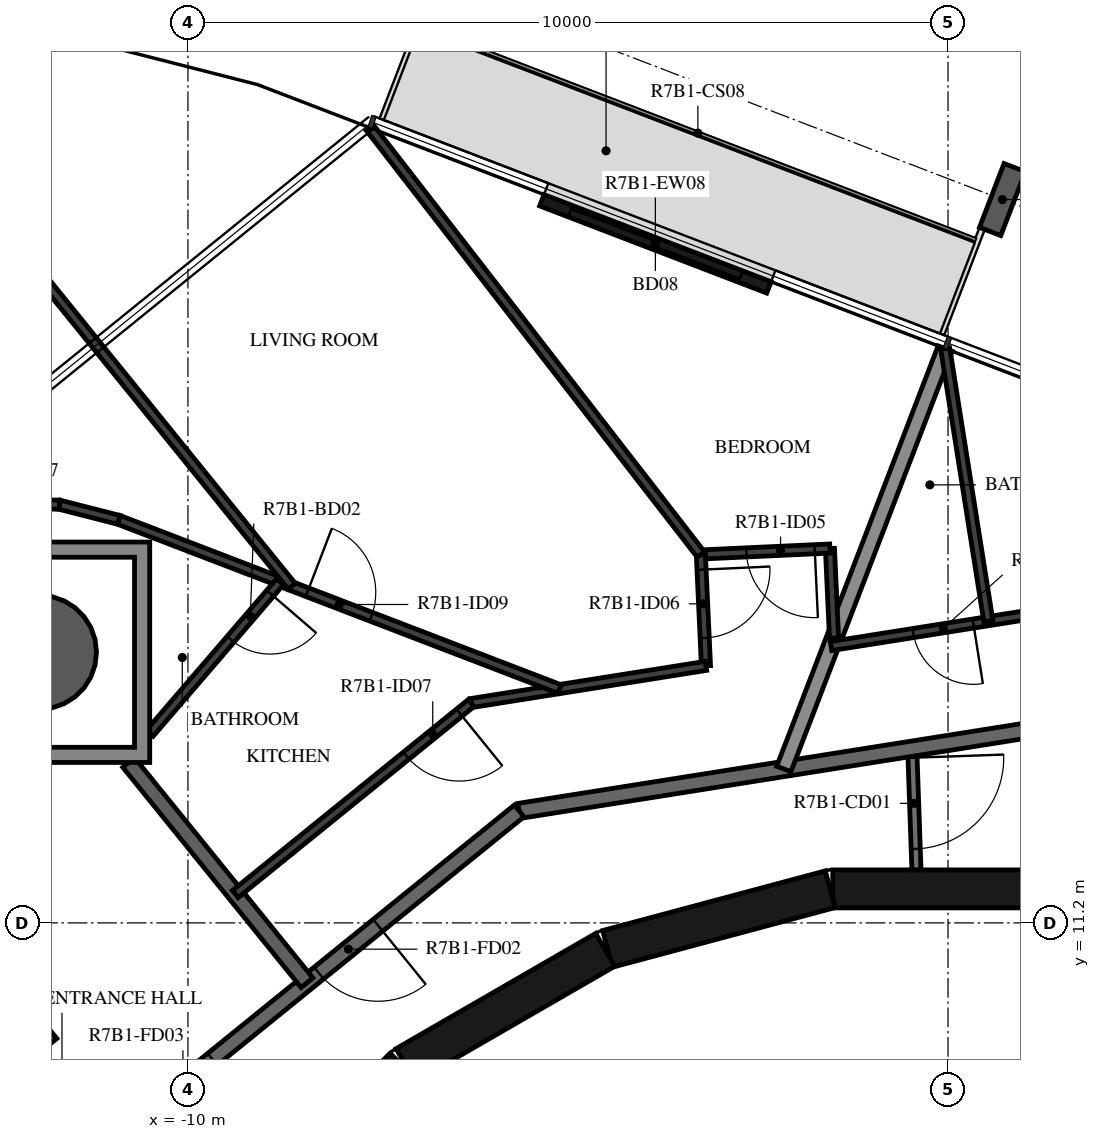
"""IFC4 building model, lengths in metres.
Left out: names, types, materials, properties, quantities, classifications, styles, units other than length and angle.
Written with IfcOpenShell. Run it as: python <this file> out.ifc"""

import sys

from ifc_helpers import new_model, si_unit, direction, frame, frame_2d, origin, origin_2d, place, context, subcontext, project, spatial, polyline, rectangle, hollow_circle, i_section, outline, extrude, element, fill, save


model = new_model("IFC4")
c1 = context("Model", 3, precision=1e-05, world=origin(), true_north=direction((0.0, 1.0)))
c2 = subcontext(c1, "Body", "Model", "MODEL_VIEW")
j1 = project(units=[si_unit("LENGTHUNIT", "METRE"), si_unit("PLANEANGLEUNIT", "RADIAN")], contexts=[c1])
p1 = place(None, origin())
s1 = spatial("IfcSite", under=j1, at=p1, CompositionType="ELEMENT")
p2 = place(p1, origin())
s2 = spatial("IfcBuilding", under=s1, at=p2, CompositionType="ELEMENT")
p3 = place(p2, frame((0.0, 0.0, 273.9)))
s3 = spatial("IfcBuildingStorey", under=s2, at=p3, CompositionType="ELEMENT", Elevation=273.9)
p4 = place(p3, frame((-11.953, 14.76, -0.38), z_axis=(0.0, 0.0, 1.0), x_axis=(1.0, 0.0, 0.0)))
e1 = element("IfcColumn", 1, at=p4, inside=s3, PredefinedType="COLUMN", context=c2, shape_type="SweptSolid", body=[
    extrude(hollow_circle(Radius=0.75, WallThickness=0.035, at=origin_2d()), origin(), (0.0, 0.0, 1.0), 3.5),
])
p5 = place(p3, frame((0.715, 20.716, -0.38), z_axis=(0.0, 0.0, 1.0), x_axis=(0.933580354843, -0.35836813621, 0.0)))
e2 = element("IfcColumn", 2, at=p5, inside=s3, PredefinedType="COLUMN", context=c2, shape_type="SweptSolid", body=[
    extrude(i_section(OverallWidth=0.3, OverallDepth=0.9, WebThickness=0.019, FlangeThickness=0.035, FilletRadius=0.03, at=origin_2d()), origin(), (0.0, 0.0, 1.0), 3.5),
])
p6 = place(p3, frame((-2.357, 19.56, 0.0), z_axis=(0.0, 0.0, 1.0), x_axis=(-0.933553885508, 0.358437083534, 0.0)))
e3 = element("IfcWall", 3, at=p6, inside=s3, PredefinedType="STANDARD", context=c2, shape_type="SweptSolid", body=[
    extrude(rectangle(XDim=3.2, YDim=0.16, at=frame_2d((1.6, 0.0))), origin(), (0.0, 0.0, 1.0), 3.12),
])
p7 = place(p6, frame((0.4, 0.0, 0.0)))
e4 = element("IfcOpeningElement", 4, at=p7, cuts=e3, PredefinedType="OPENING", context=c2, shape_type="SweptSolid", body=[
    extrude(rectangle(XDim=2.4, YDim=2.4, at=frame_2d((1.2, 1.2))), frame((0.0, 0.09, 0.0), z_axis=(0.0, -1.0, 0.0), x_axis=(1.0, 0.0, 0.0)), (0.0, 0.0, 1.0), 0.18),
])
for number, where, z_axis, x_axis in (
    (5, (1.516, 11.647, 0.0), (0.0, 0.0, 1.0), (-1.0, 0.0, 0.0)),
    (6, (-1.55, 11.643, 0.0), (0.0, 0.0, 1.0), (-0.966, -0.259, 0.0)),
    (7, (-4.51, 10.845, 0.0), (0.0, 0.0, 1.0), (-0.866, -0.5, 0.0)),
):
    element("IfcWall", number, at=place(p3, frame(where, z_axis=z_axis, x_axis=x_axis)), inside=s3, PredefinedType="SHEAR", context=c2, shape_type="SweptSolid", body=[
        extrude(rectangle(XDim=3.033, YDim=0.5, at=frame_2d((1.516, 0.0))), origin(), (0.0, 0.0, 1.0), 3.12),
    ])
p8 = place(p3, frame((-7.164, 9.308, 0.0), z_axis=(0.0, 0.0, 1.0), x_axis=(-0.707106781187, -0.707106781187, 0.0)))
e8 = element("IfcWall", 8, at=p8, inside=s3, PredefinedType="SHEAR", context=c2, shape_type="SweptSolid", body=[
    extrude(rectangle(XDim=3.032, YDim=0.5, at=frame_2d((1.516, 0.0))), origin(), (0.0, 0.0, 1.0), 3.12),
])
p9 = place(p8, frame((1.416, 0.0, 0.0)))
e9 = element("IfcOpeningElement", 9, at=p9, cuts=e8, PredefinedType="OPENING", context=c2, shape_type="SweptSolid", body=[
    extrude(rectangle(XDim=1.2, YDim=2.1, at=frame_2d((0.6, 1.05))), frame((0.0, 0.26, 0.0), z_axis=(0.0, -1.0, 0.0), x_axis=(1.0, 0.0, 0.0)), (0.0, 0.0, 1.0), 0.52),
])
p10 = place(p3, frame((-0.471, 13.492, 0.0), z_axis=(0.0, 0.0, 1.0), x_axis=(0.034873173869, -0.999391745886, 0.0)))
e10 = element("IfcWall", 10, at=p10, inside=s3, PredefinedType="PARTITIONING", context=c2, shape_type="SweptSolid", body=[
    extrude(rectangle(XDim=1.596, YDim=0.12, at=frame_2d((0.798, 0.0))), origin(), (0.0, 0.0, 1.0), 3.12),
])
p11 = place(p10, frame((0.12, 0.0, 0.0)))
e11 = element("IfcOpeningElement", 11, at=p11, cuts=e10, PredefinedType="OPENING", context=c2, shape_type="SweptSolid", body=[
    extrude(rectangle(XDim=1.2, YDim=2.1, at=frame_2d((0.6, 1.05))), frame((0.0, 0.07, 0.0), z_axis=(0.0, -1.0, 0.0), x_axis=(1.0, 0.0, 0.0)), (0.0, 0.0, 1.0), 0.14),
])
p12 = place(p3, frame((1.45, 13.797, 0.0), z_axis=(0.0, 0.0, 1.0), x_axis=(-0.987690361611, -0.156421704315, 0.0)))
e12 = element("IfcWall", 12, at=p12, inside=s3, PredefinedType="STANDARD", context=c2, shape_type="SweptSolid", body=[
    extrude(rectangle(XDim=7.181, YDim=0.2, at=frame_2d((3.591, 0.0))), origin(), (0.0, 0.0, 1.0), 3.12),
])
p13 = place(p3, frame((-5.643, 12.673, 0.0), z_axis=(0.0, 0.0, 1.0), x_axis=(-0.777160148113, -0.629302871585, 0.0)))
e13 = element("IfcWall", 13, at=p13, inside=s3, PredefinedType="STANDARD", context=c2, shape_type="SweptSolid", body=[
    extrude(rectangle(XDim=7.181, YDim=0.2, at=frame_2d((3.59, 0.0))), origin(), (0.0, 0.0, 1.0), 3.12),
])
p14 = place(p13, frame((2.39, 0.0, 0.0)))
e14 = element("IfcOpeningElement", 14, at=p14, cuts=e13, PredefinedType="OPENING", context=c2, shape_type="SweptSolid", body=[
    extrude(rectangle(XDim=1.0, YDim=2.1, at=frame_2d((0.5, 1.05))), frame((0.0, 0.11, 0.0), z_axis=(0.0, -1.0, 0.0), x_axis=(1.0, 0.0, 0.0)), (0.0, 0.0, 1.0), 0.22),
])
p15 = place(p13, frame((5.192, 0.0, 0.0)))
e15 = element("IfcOpeningElement", 15, at=p15, cuts=e13, PredefinedType="OPENING", context=c2, shape_type="SweptSolid", body=[
    extrude(rectangle(XDim=1.0, YDim=2.1, at=frame_2d((0.5, 1.05))), frame((0.0, 0.11, 0.0), z_axis=(0.0, -1.0, 0.0), x_axis=(1.0, 0.0, 0.0)), (0.0, 0.0, 1.0), 0.22),
])
p16 = place(p3, frame((-0.037, 18.756, 0.0), z_axis=(0.0, 0.0, 1.0), x_axis=(-0.358365943542, -0.933581196527, 0.0)))
e16 = element("IfcWall", 16, at=p16, inside=s3, PredefinedType="STANDARD", context=c2, shape_type="SweptSolid", body=[
    extrude(rectangle(XDim=5.924, YDim=0.2, at=frame_2d((2.962, 0.0))), origin(), (0.0, 0.0, 1.0), 2.73),
])
p17 = place(p3, frame((-10.779, 13.31, 0.0), z_axis=(0.0, 0.0, 1.0), x_axis=(0.62931692753, -0.777148766147, 0.0)))
e17 = element("IfcWall", 17, at=p17, inside=s3, PredefinedType="STANDARD", context=c2, shape_type="SweptSolid", body=[
    extrude(rectangle(XDim=3.727, YDim=0.2, at=frame_2d((1.864, 0.0))), origin(), (0.0, 0.0, 1.0), 3.12),
])
p18 = place(p3, frame((1.612, 15.341, 0.0), z_axis=(0.0, 0.0, 1.0), x_axis=(-0.987687176419, -0.156441815179, 0.0)))
e18 = element("IfcWall", 18, at=p18, inside=s3, PredefinedType="PARTITIONING", context=c2, shape_type="SweptSolid", body=[
    extrude(rectangle(XDim=3.191, YDim=0.12, at=frame_2d((1.596, 0.0))), origin(), (0.0, 0.0, 1.0), 3.12),
])
p19 = place(p18, frame((1.295, 0.0, 0.0)))
e19 = element("IfcOpeningElement", 19, at=p19, cuts=e18, PredefinedType="OPENING", context=c2, shape_type="SweptSolid", body=[
    extrude(rectangle(XDim=0.8, YDim=2.1, at=frame_2d((0.4, 1.05))), frame((0.0, 0.07, 0.0), z_axis=(0.0, -1.0, 0.0), x_axis=(1.0, 0.0, 0.0)), (0.0, 0.0, 1.0), 0.14),
])
p20 = place(p3, frame((-0.037, 18.756, 0.0), z_axis=(0.0, 0.0, 1.0), x_axis=(0.156421851095, -0.987690338365, 0.0)))
e20 = element("IfcWall", 20, at=p20, inside=s3, PredefinedType="PARTITIONING", context=c2, shape_type="SweptSolid", body=[
    extrude(rectangle(XDim=3.63, YDim=0.12, at=frame_2d((1.815, 0.0))), origin(), (0.0, 0.0, 1.0), 3.12),
])
p21 = place(p3, frame((-1.5, 14.946, 0.0), z_axis=(0.0, 0.0, 1.0), x_axis=(-0.045923747874, 0.998944948123, 0.0)))
e21 = element("IfcWall", 21, at=p21, inside=s3, PredefinedType="PARTITIONING", context=c2, shape_type="SweptSolid", body=[
    extrude(rectangle(XDim=1.18, YDim=0.12, at=frame_2d((0.59, 0.0))), origin(), (0.0, 0.0, 1.0), 3.12),
])
p22 = place(p3, frame((-1.554, 16.125, 0.0), z_axis=(0.0, 0.0, 1.0), x_axis=(-0.998943517875, -0.045954848436, 0.0)))
e22 = element("IfcWall", 22, at=p22, inside=s3, PredefinedType="PARTITIONING", context=c2, shape_type="SweptSolid", body=[
    extrude(rectangle(XDim=1.7, YDim=0.12, at=frame_2d((0.85, 0.0))), origin(), (0.0, 0.0, 1.0), 3.12),
])
p23 = place(p22, frame((0.2, 0.0, 0.0)))
e23 = element("IfcOpeningElement", 23, at=p23, cuts=e22, PredefinedType="OPENING", context=c2, shape_type="SweptSolid", body=[
    extrude(rectangle(XDim=0.9, YDim=2.1, at=frame_2d((0.45, 1.05))), frame((0.0, 0.07, 0.0), z_axis=(0.0, -1.0, 0.0), x_axis=(1.0, 0.0, 0.0)), (0.0, 0.0, 1.0), 0.14),
])
p24 = place(p3, frame((-3.252, 16.047, 0.0), z_axis=(0.0, 0.0, 1.0), x_axis=(0.045928493331, -0.998944729953, 0.0)))
e24 = element("IfcWall", 24, at=p24, inside=s3, PredefinedType="PARTITIONING", context=c2, shape_type="SweptSolid", body=[
    extrude(rectangle(XDim=1.467, YDim=0.12, at=frame_2d((0.733, 0.0))), origin(), (0.0, 0.0, 1.0), 3.12),
])
p25 = place(p24, frame((0.2, 0.0, 0.0)))
e25 = element("IfcOpeningElement", 25, at=p25, cuts=e24, PredefinedType="OPENING", context=c2, shape_type="SweptSolid", body=[
    extrude(rectangle(XDim=0.9, YDim=2.1, at=frame_2d((0.45, 1.05))), frame((0.0, 0.07, 0.0), z_axis=(0.0, -1.0, 0.0), x_axis=(1.0, 0.0, 0.0)), (0.0, 0.0, 1.0), 0.14),
])
p26 = place(p3, frame((-3.185, 14.581, 0.0), z_axis=(0.0, 0.0, 1.0), x_axis=(-0.987690712769, -0.156419486991, 0.0)))
e26 = element("IfcWall", 26, at=p26, inside=s3, PredefinedType="PARTITIONING", context=c2, shape_type="SweptSolid", body=[
    extrude(rectangle(XDim=3.128, YDim=0.12, at=frame_2d((1.564, 0.0))), origin(), (0.0, 0.0, 1.0), 3.12),
])
p27 = place(p3, frame((-6.274, 14.092, 0.0), z_axis=(0.0, 0.0, 1.0), x_axis=(-0.777162268892, -0.629300252511, 0.0)))
e27 = element("IfcWall", 27, at=p27, inside=s3, PredefinedType="PARTITIONING", context=c2, shape_type="SweptSolid", body=[
    extrude(rectangle(XDim=3.992, YDim=0.12, at=frame_2d((1.996, 0.0))), origin(), (0.0, 0.0, 1.0), 3.12),
])
p28 = place(p27, frame((0.2, 0.0, 0.0)))
e28 = element("IfcOpeningElement", 28, at=p28, cuts=e27, PredefinedType="OPENING", context=c2, shape_type="SweptSolid", body=[
    extrude(rectangle(XDim=0.9, YDim=2.1, at=frame_2d((0.45, 1.05))), frame((0.0, 0.07, 0.0), z_axis=(0.0, -1.0, 0.0), x_axis=(1.0, 0.0, 0.0)), (0.0, 0.0, 1.0), 0.14),
])
p29 = place(p3, frame((-7.606, 21.661, 0.0), z_axis=(0.0, 0.0, 1.0), x_axis=(0.612852858705, -0.79019704731, 0.0)))
e29 = element("IfcWall", 29, at=p29, inside=s3, PredefinedType="PARTITIONING", context=c2, shape_type="SweptSolid", body=[
    extrude(rectangle(XDim=7.105, YDim=0.12, at=frame_2d((3.552, 0.0))), origin(), (0.0, 0.0, 1.0), 3.12),
])
p30 = place(p3, frame((-10.91, 16.502, 0.0), z_axis=(0.0, 0.0, 1.0), x_axis=(0.933584453869, -0.358357457707, 0.0)))
e30 = element("IfcWall", 30, at=p30, inside=s3, PredefinedType="PARTITIONING", context=c2, shape_type="SweptSolid", body=[
    extrude(rectangle(XDim=6.212, YDim=0.12, at=frame_2d((3.106, 0.0))), origin(), (0.0, 0.0, 1.0), 3.12),
])
p31 = place(p30, frame((2.657, 0.0, 0.0)))
e31 = element("IfcOpeningElement", 31, at=p31, cuts=e30, PredefinedType="OPENING", context=c2, shape_type="SweptSolid", body=[
    extrude(rectangle(XDim=0.9, YDim=2.1, at=frame_2d((0.45, 1.05))), frame((0.0, 0.07, 0.0), z_axis=(0.0, -1.0, 0.0), x_axis=(1.0, 0.0, 0.0)), (0.0, 0.0, 1.0), 0.14),
])
p32 = place(p3, frame((-14.132, 22.418, 0.0), z_axis=(0.0, 0.0, 1.0), x_axis=(0.629309172704, -0.77715504576, 0.0)))
e32 = element("IfcWall", 32, at=p32, inside=s3, PredefinedType="PARTITIONING", context=c2, shape_type="SweptSolid", body=[
    extrude(rectangle(XDim=8.736, YDim=0.12, at=frame_2d((4.368, 0.0))), origin(), (0.0, 0.0, 1.0), 3.12),
])
p33 = place(p32, frame((0.4, 0.0, 0.0)))
e33 = element("IfcOpeningElement", 33, at=p33, cuts=e32, PredefinedType="OPENING", context=c2, shape_type="SweptSolid", body=[
    extrude(rectangle(XDim=0.9, YDim=2.1, at=frame_2d((0.45, 1.05))), frame((0.0, 0.07, 0.0), z_axis=(0.0, -1.0, 0.0), x_axis=(1.0, 0.0, 0.0)), (0.0, 0.0, 1.0), 0.14),
])
p34 = place(p3, frame((-8.788, 15.688, 0.0), z_axis=(0.0, 0.0, 1.0), x_axis=(-0.652090514391, -0.758141122115, 0.0)))
e34 = element("IfcWall", 34, at=p34, inside=s3, PredefinedType="PARTITIONING", context=c2, shape_type="SweptSolid", body=[
    extrude(rectangle(XDim=2.629, YDim=0.12, at=frame_2d((1.314, 0.0))), origin(), (0.0, 0.0, 1.0), 3.12),
])
p35 = place(p34, frame((0.2, 0.0, 0.0)))
e35 = element("IfcOpeningElement", 35, at=p35, cuts=e34, PredefinedType="OPENING", context=c2, shape_type="SweptSolid", body=[
    extrude(rectangle(XDim=0.8, YDim=2.1, at=frame_2d((0.4, 1.05))), frame((0.0, 0.07, 0.0), z_axis=(0.0, -1.0, 0.0), x_axis=(1.0, 0.0, 0.0)), (0.0, 0.0, 1.0), 0.14),
])
p36 = place(p3, frame((-10.91, 16.502, 0.0), z_axis=(0.0, 0.0, 1.0), x_axis=(-0.96886520615, 0.247588796823, 0.0)))
e36 = element("IfcWall", 36, at=p36, inside=s3, PredefinedType="PARTITIONING", context=c2, shape_type="SweptSolid", body=[
    extrude(rectangle(XDim=0.807, YDim=0.12, at=frame_2d((0.403, 0.0))), origin(), (0.0, 0.0, 1.0), 3.12),
])
p37 = place(p3, frame((-11.691, 16.702, 0.0), z_axis=(0.0, 0.0, 1.0), x_axis=(-0.999843155249, 0.017710587291, 0.0)))
e37 = element("IfcWall", 37, at=p37, inside=s3, PredefinedType="PARTITIONING", context=c2, shape_type="SweptSolid", body=[
    extrude(rectangle(XDim=0.455, YDim=0.12, at=frame_2d((0.228, 0.0))), origin(), (0.0, 0.0, 1.0), 3.12),
])
p38 = place(p3, frame((-13.901, 12.271, 0.0), z_axis=(0.0, 0.0, 1.0), x_axis=(0.62932066967, -0.777145735835, 0.0)))
e38 = element("IfcWall", 38, at=p38, inside=s3, PredefinedType="PARTITIONING", context=c2, shape_type="SweptSolid", body=[
    extrude(rectangle(XDim=3.384, YDim=0.12, at=frame_2d((1.692, 0.0))), origin(), (0.0, 0.0, 1.0), 3.12),
])
p39 = place(p38, frame((0.2, 0.0, 0.0)))
e39 = element("IfcOpeningElement", 39, at=p39, cuts=e38, PredefinedType="OPENING", context=c2, shape_type="SweptSolid", body=[
    extrude(rectangle(XDim=0.9, YDim=2.1, at=frame_2d((0.45, 1.05))), frame((0.0, 0.07, 0.0), z_axis=(0.0, -1.0, 0.0), x_axis=(1.0, 0.0, 0.0)), (0.0, 0.0, 1.0), 0.14),
])
p40 = place(p3, origin())
e40 = element("IfcWall", 40, at=p40, inside=s3, PredefinedType="STANDARD", context=c2, shape_type="SweptSolid", body=[
    extrude(outline(polyline([(-10.503, 16.21), (-10.503, 13.311), (-13.403, 13.311), (-13.403, 16.21), (-10.503, 16.21)]), holes=[polyline([(-13.203, 13.51), (-10.703, 13.51), (-10.703, 16.01), (-13.203, 16.01), (-13.203, 13.51)])]), origin(), (0.0, 0.0, 1.0), 3.12),
])
p41 = place(p7, origin())
e41 = element("IfcDoor", 41, at=p41, inside=s3, OperationType="DOUBLE_DOOR_SLIDING", PredefinedType="DOOR", context=c2, shape_type="SweptSolid", body=[
    extrude(rectangle(XDim=2.4, YDim=2.4, at=frame_2d((1.2, 1.2))), frame((0.0, 0.025, 0.0), z_axis=(0.0, -1.0, 0.0), x_axis=(1.0, 0.0, 0.0)), (0.0, 0.0, 1.0), 0.05),
])
fill(e4, e41)
p42 = place(p19, origin())
e42 = element("IfcDoor", 42, at=p42, inside=s3, OperationType="SINGLE_SWING_RIGHT", PredefinedType="DOOR", context=c2, shape_type="SweptSolid", body=[
    extrude(rectangle(XDim=0.8, YDim=2.1, at=frame_2d((0.4, 1.05))), frame((0.0, 0.025, 0.0), z_axis=(0.0, -1.0, 0.0), x_axis=(1.0, 0.0, 0.0)), (0.0, 0.0, 1.0), 0.05),
])
fill(e19, e42)
p43 = place(p14, origin())
e43 = element("IfcDoor", 43, at=p43, inside=s3, OperationType="SINGLE_SWING_RIGHT", PredefinedType="DOOR", context=c2, shape_type="SweptSolid", body=[
    extrude(rectangle(XDim=1.0, YDim=2.1, at=frame_2d((0.5, 1.05))), frame((0.0, 0.025, 0.0), z_axis=(0.0, -1.0, 0.0), x_axis=(1.0, 0.0, 0.0)), (0.0, 0.0, 1.0), 0.05),
])
fill(e14, e43)
p44 = place(p23, origin())
e44 = element("IfcDoor", 44, at=p44, inside=s3, OperationType="SINGLE_SWING_RIGHT", PredefinedType="DOOR", context=c2, shape_type="SweptSolid", body=[
    extrude(rectangle(XDim=0.9, YDim=2.1, at=frame_2d((0.45, 1.05))), frame((0.0, 0.025, 0.0), z_axis=(0.0, -1.0, 0.0), x_axis=(1.0, 0.0, 0.0)), (0.0, 0.0, 1.0), 0.05),
])
fill(e23, e44)
p45 = place(p25, origin())
e45 = element("IfcDoor", 45, at=p45, inside=s3, OperationType="SINGLE_SWING_LEFT", PredefinedType="DOOR", context=c2, shape_type="SweptSolid", body=[
    extrude(rectangle(XDim=0.9, YDim=2.1, at=frame_2d((0.45, 1.05))), frame((0.0, 0.025, 0.0), z_axis=(0.0, -1.0, 0.0), x_axis=(1.0, 0.0, 0.0)), (0.0, 0.0, 1.0), 0.05),
])
fill(e25, e45)
p46 = place(p28, origin())
e46 = element("IfcDoor", 46, at=p46, inside=s3, OperationType="SINGLE_SWING_RIGHT", PredefinedType="DOOR", context=c2, shape_type="SweptSolid", body=[
    extrude(rectangle(XDim=0.9, YDim=2.1, at=frame_2d((0.45, 1.05))), frame((0.0, 0.025, 0.0), z_axis=(0.0, -1.0, 0.0), x_axis=(1.0, 0.0, 0.0)), (0.0, 0.0, 1.0), 0.05),
])
fill(e28, e46)
p47 = place(p35, origin())
e47 = element("IfcDoor", 47, at=p47, inside=s3, OperationType="SINGLE_SWING_RIGHT", PredefinedType="DOOR", context=c2, shape_type="SweptSolid", body=[
    extrude(rectangle(XDim=0.8, YDim=2.1, at=frame_2d((0.4, 1.05))), frame((0.0, 0.025, 0.0), z_axis=(0.0, -1.0, 0.0), x_axis=(1.0, 0.0, 0.0)), (0.0, 0.0, 1.0), 0.05),
])
fill(e35, e47)
p48 = place(p31, origin())
e48 = element("IfcDoor", 48, at=p48, inside=s3, OperationType="SINGLE_SWING_LEFT", PredefinedType="DOOR", context=c2, shape_type="SweptSolid", body=[
    extrude(rectangle(XDim=0.9, YDim=2.1, at=frame_2d((0.45, 1.05))), frame((0.0, 0.025, 0.0), z_axis=(0.0, -1.0, 0.0), x_axis=(1.0, 0.0, 0.0)), (0.0, 0.0, 1.0), 0.05),
])
fill(e31, e48)
p49 = place(p15, origin())
e49 = element("IfcDoor", 49, at=p49, inside=s3, OperationType="SINGLE_SWING_LEFT", PredefinedType="DOOR", context=c2, shape_type="SweptSolid", body=[
    extrude(rectangle(XDim=1.0, YDim=2.1, at=frame_2d((0.5, 1.05))), frame((0.0, 0.025, 0.0), z_axis=(0.0, -1.0, 0.0), x_axis=(1.0, 0.0, 0.0)), (0.0, 0.0, 1.0), 0.05),
])
fill(e15, e49)
p50 = place(p11, origin())
e50 = element("IfcDoor", 50, at=p50, inside=s3, OperationType="DOUBLE_DOOR_SINGLE_SWING", PredefinedType="DOOR", context=c2, shape_type="SweptSolid", body=[
    extrude(rectangle(XDim=1.2, YDim=2.1, at=frame_2d((0.6, 1.05))), frame((0.0, 0.025, 0.0), z_axis=(0.0, -1.0, 0.0), x_axis=(1.0, 0.0, 0.0)), (0.0, 0.0, 1.0), 0.05),
])
fill(e11, e50)
save(model, sys.argv[1])
